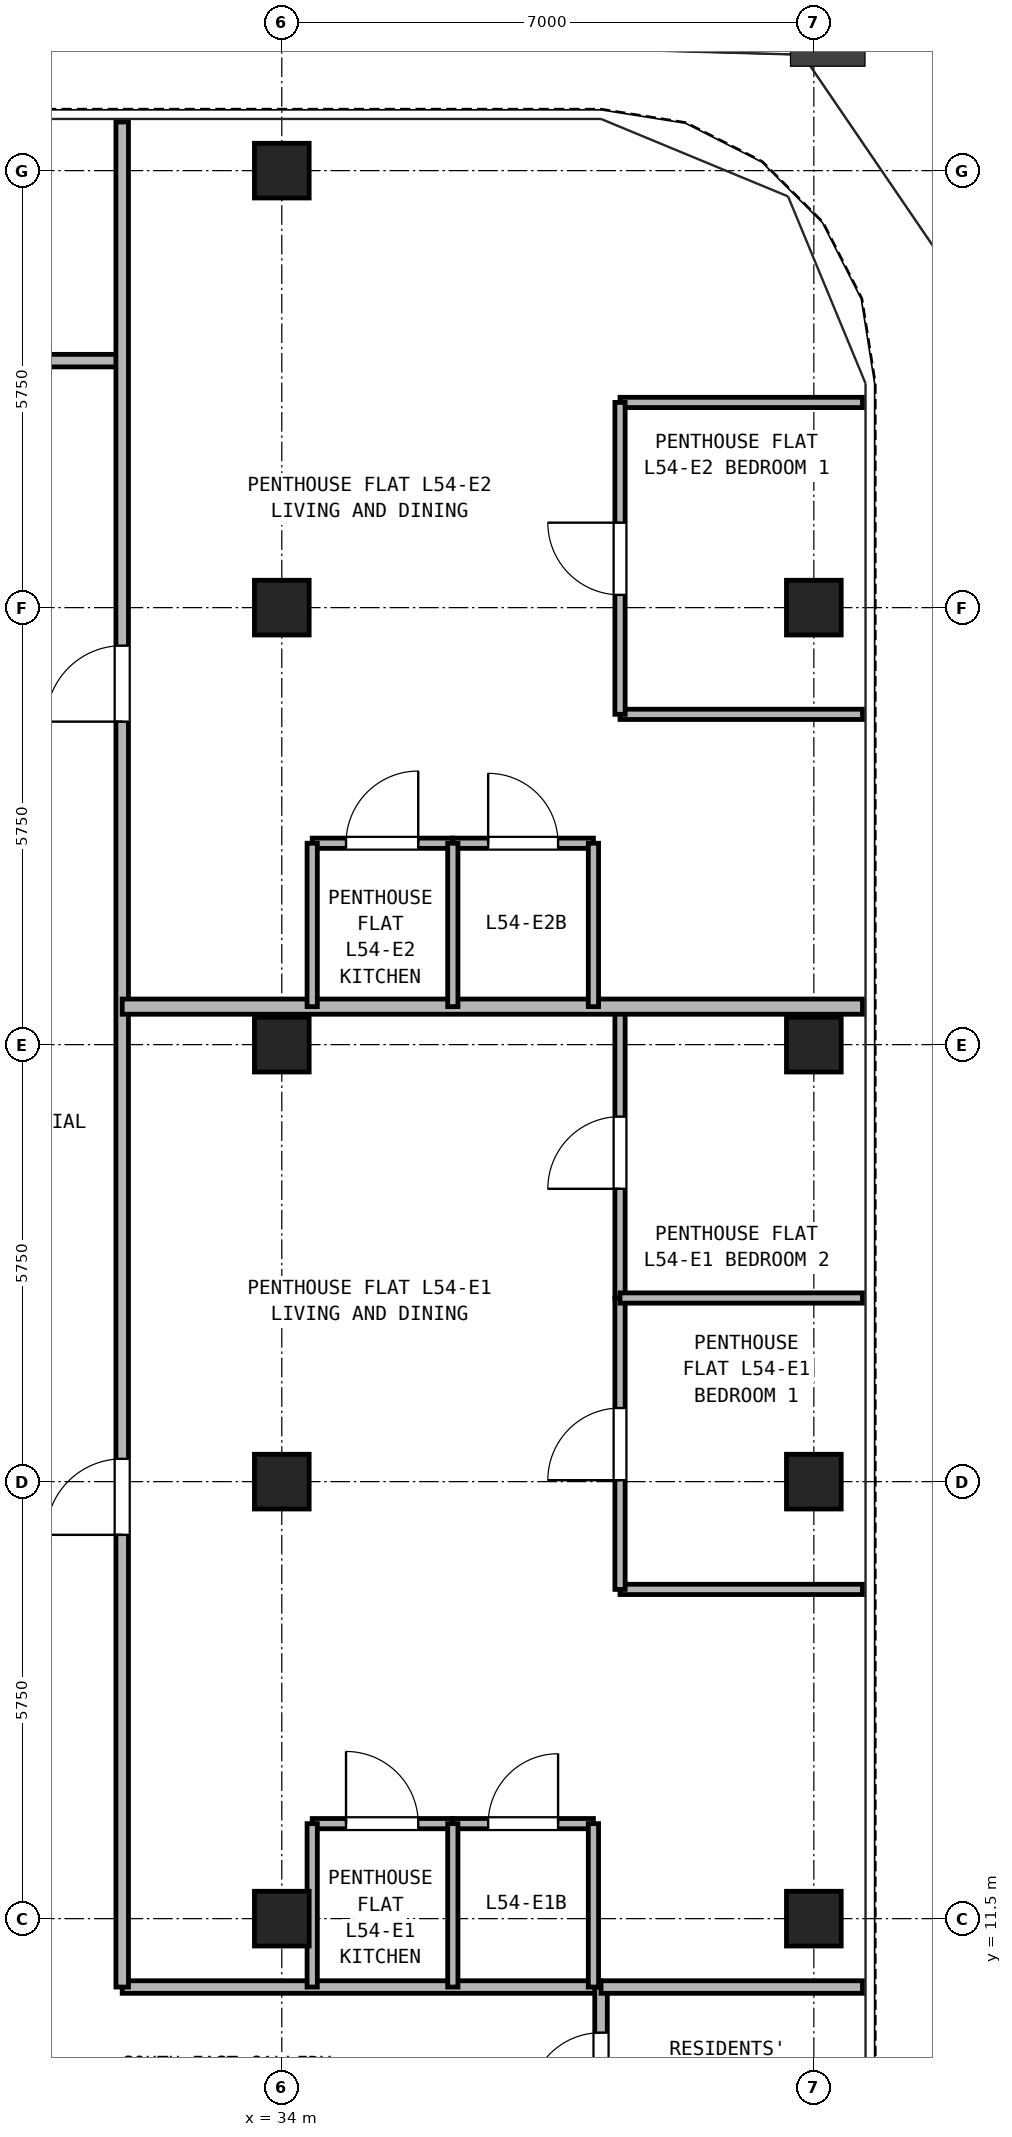
"""IFC4 building model, lengths in metres.
Left out: names, types, materials, properties, quantities, classifications, styles, units other than length and angle.
Written with IfcOpenShell. Run it as: python <this file> out.ifc"""

import sys

from ifc_helpers import new_model, si_unit, direction, frame, frame_2d, origin, origin_2d, place, context, subcontext, project, spatial, rectangle, hollow_rectangle, extrude, source, transform, mapped, element, fill, save


model = new_model("IFC4")
c1 = context("Model", 3, precision=1e-05, world=origin(), true_north=direction((0.0, 1.0)))
c2 = subcontext(c1, "Body", "Model", "MODEL_VIEW")
j1 = project(units=[si_unit("LENGTHUNIT", "METRE"), si_unit("PLANEANGLEUNIT", "RADIAN")], contexts=[c1])
p1 = place(None, origin())
s1 = spatial("IfcSite", under=j1, at=p1, CompositionType="ELEMENT")
p2 = place(p1, origin())
s2 = spatial("IfcBuilding", under=s1, at=p2, CompositionType="ELEMENT")
p3 = place(p2, frame((0.0, 0.0, 193.2)))
s3 = spatial("IfcBuildingStorey", under=s2, at=p3, CompositionType="ELEMENT", Elevation=193.2)
m1 = source(origin(), c2, "Body", "SweptSolid", [
    extrude(hollow_rectangle(XDim=0.72, YDim=0.72, WallThickness=0.04, at=origin_2d()), origin(), (0.0, 0.0, 1.0), 2.95),
])
for number, where, z_axis, x_axis in (
    (1, (34.0, 34.5, 0.0), (0.0, 0.0, 1.0), (1.0, 0.0, 0.0)),
    (2, (41.0, 11.5, 0.0), (0.0, 0.0, 1.0), (1.0, 0.0, 0.0)),
    (3, (41.0, 17.25, 0.0), (0.0, 0.0, 1.0), (1.0, 0.0, 0.0)),
    (4, (41.0, 23.0, 0.0), (0.0, 0.0, 1.0), (1.0, 0.0, 0.0)),
    (5, (41.0, 28.75, 0.0), (0.0, 0.0, 1.0), (1.0, 0.0, 0.0)),
    (6, (34.0, 11.5, 0.0), (0.0, 0.0, 1.0), (1.0, 0.0, 0.0)),
    (7, (34.0, 17.25, 0.0), (0.0, 0.0, 1.0), (1.0, 0.0, 0.0)),
    (8, (34.0, 23.0, 0.0), (0.0, 0.0, 1.0), (1.0, 0.0, 0.0)),
    (9, (34.0, 28.75, 0.0), (0.0, 0.0, 1.0), (1.0, 0.0, 0.0)),
):
    element("IfcColumn", number, at=place(p3, frame(where, z_axis=z_axis, x_axis=x_axis)), inside=s3, PredefinedType="COLUMN", context=c2, shape_type="MappedRepresentation", body=[
        mapped(m1, transform((0.0, 0.0, 0.0), x_axis=(1.0, 0.0, 0.0), y_axis=(0.0, 1.0, 0.0), z_axis=(0.0, 0.0, 1.0), scale=1.0)),
    ])
p4 = place(p3, frame((31.9, 10.6, 0.0), z_axis=(0.0, 0.0, 1.0), x_axis=(1.0, 0.0, 0.0)))
e10 = element("IfcWall", 10, at=p4, inside=s3, PredefinedType="PARTITIONING", context=c2, shape_type="SweptSolid", body=[
    extrude(rectangle(XDim=6.3, YDim=0.165, at=frame_2d((3.15, 0.0))), origin(), (0.0, 0.0, 1.0), 2.95),
])
p5 = place(p3, frame((38.2, 8.6, 0.0), z_axis=(0.0, 0.0, 1.0), x_axis=(0.0, 1.0, 0.0)))
e11 = element("IfcWall", 11, at=p5, inside=s3, PredefinedType="PARTITIONING", context=c2, shape_type="SweptSolid", body=[
    extrude(rectangle(XDim=2.0, YDim=0.165, at=frame_2d((1.0, 0.0))), origin(), (0.0, 0.0, 1.0), 2.95),
])
p6 = place(p5, frame((0.45, 0.0, 0.0)))
e12 = element("IfcOpeningElement", 12, at=p6, cuts=e11, PredefinedType="OPENING", context=c2, shape_type="SweptSolid", body=[
    extrude(rectangle(XDim=0.95, YDim=2.15, at=frame_2d((0.475, 1.075))), frame((0.0, 0.093, 0.0), z_axis=(0.0, -1.0, 0.0), x_axis=(1.0, 0.0, 0.0)), (0.0, 0.0, 1.0), 0.185),
])
p7 = place(p3, frame((15.1, 32.0, 0.0), z_axis=(0.0, 0.0, 1.0), x_axis=(1.0, 0.0, 0.0)))
e13 = element("IfcWall", 13, at=p7, inside=s3, PredefinedType="PARTITIONING", context=c2, shape_type="SweptSolid", body=[
    extrude(rectangle(XDim=16.8, YDim=0.165, at=frame_2d((8.4, 0.0))), origin(), (0.0, 0.0, 1.0), 2.95),
])
p8 = place(p7, frame((2.7, 0.0, 0.0)))
e14 = element("IfcOpeningElement", 14, at=p8, cuts=e13, PredefinedType="OPENING", context=c2, shape_type="SweptSolid", body=[
    extrude(rectangle(XDim=0.95, YDim=2.15, at=frame_2d((0.475, 1.075))), frame((0.0, 0.093, 0.0), z_axis=(0.0, -1.0, 0.0), x_axis=(1.0, 0.0, 0.0)), (0.0, 0.0, 1.0), 0.185),
])
p9 = place(p7, frame((8.1, 0.0, 0.0)))
e15 = element("IfcOpeningElement", 15, at=p9, cuts=e13, PredefinedType="OPENING", context=c2, shape_type="SweptSolid", body=[
    extrude(rectangle(XDim=0.95, YDim=2.15, at=frame_2d((0.475, 1.075))), frame((0.0, 0.093, 0.0), z_axis=(0.0, -1.0, 0.0), x_axis=(1.0, 0.0, 0.0)), (0.0, 0.0, 1.0), 0.185),
])
p10 = place(p7, frame((13.3, 0.0, 0.0)))
e16 = element("IfcOpeningElement", 16, at=p10, cuts=e13, PredefinedType="OPENING", context=c2, shape_type="SweptSolid", body=[
    extrude(rectangle(XDim=0.92, YDim=2.1, at=frame_2d((0.46, 1.05))), frame((0.0, 0.093, 0.0), z_axis=(0.0, -1.0, 0.0), x_axis=(1.0, 0.0, 0.0)), (0.0, 0.0, 1.0), 0.185),
])
p11 = place(p3, frame((31.9, 10.6, 0.0), z_axis=(0.0, 0.0, 1.0), x_axis=(0.0, 1.0, 0.0)))
e17 = element("IfcWall", 17, at=p11, inside=s3, PredefinedType="PARTITIONING", context=c2, shape_type="SweptSolid", body=[
    extrude(rectangle(XDim=24.54, YDim=0.165, at=frame_2d((12.27, 0.0))), origin(), (0.0, 0.0, 1.0), 2.95),
])
p12 = place(p11, frame((5.95, 0.0, 0.0)))
e18 = element("IfcOpeningElement", 18, at=p12, cuts=e17, PredefinedType="OPENING", context=c2, shape_type="SweptSolid", body=[
    extrude(rectangle(XDim=1.0, YDim=2.15, at=frame_2d((0.5, 1.075))), frame((0.0, 0.093, 0.0), z_axis=(0.0, -1.0, 0.0), x_axis=(1.0, 0.0, 0.0)), (0.0, 0.0, 1.0), 0.185),
])
p13 = place(p11, frame((16.65, 0.0, 0.0)))
e19 = element("IfcOpeningElement", 19, at=p13, cuts=e17, PredefinedType="OPENING", context=c2, shape_type="SweptSolid", body=[
    extrude(rectangle(XDim=1.0, YDim=2.15, at=frame_2d((0.5, 1.075))), frame((0.0, 0.093, 0.0), z_axis=(0.0, -1.0, 0.0), x_axis=(1.0, 0.0, 0.0)), (0.0, 0.0, 1.0), 0.185),
])
p14 = place(p3, frame((38.2, 10.6, 0.0), z_axis=(0.0, 0.0, 1.0), x_axis=(1.0, 0.0, 0.0)))
e20 = element("IfcWall", 20, at=p14, inside=s3, PredefinedType="PARTITIONING", context=c2, shape_type="SweptSolid", body=[
    extrude(rectangle(XDim=3.44, YDim=0.165, at=frame_2d((1.72, 0.0))), origin(), (0.0, 0.0, 1.0), 2.95),
])
p15 = place(p3, frame((34.4, 12.75, 0.0), z_axis=(0.0, 0.0, 1.0), x_axis=(1.0, 0.0, 0.0)))
e21 = element("IfcWall", 21, at=p15, inside=s3, PredefinedType="PARTITIONING", context=c2, shape_type="SweptSolid", body=[
    extrude(rectangle(XDim=1.85, YDim=0.135, at=frame_2d((0.925, 0.0))), origin(), (0.0, 0.0, 1.0), 2.95),
])
p16 = place(p15, frame((0.445, 0.0, 0.0)))
e22 = element("IfcOpeningElement", 22, at=p16, cuts=e21, PredefinedType="OPENING", context=c2, shape_type="SweptSolid", body=[
    extrude(rectangle(XDim=0.95, YDim=2.15, at=frame_2d((0.475, 1.075))), frame((0.0, 0.077, 0.0), z_axis=(0.0, -1.0, 0.0), x_axis=(1.0, 0.0, 0.0)), (0.0, 0.0, 1.0), 0.155),
])
p17 = place(p3, frame((36.25, 12.75, 0.0), z_axis=(0.0, 0.0, 1.0), x_axis=(1.0, 0.0, 0.0)))
e23 = element("IfcWall", 23, at=p17, inside=s3, PredefinedType="PARTITIONING", context=c2, shape_type="SweptSolid", body=[
    extrude(rectangle(XDim=1.85, YDim=0.135, at=frame_2d((0.925, 0.0))), origin(), (0.0, 0.0, 1.0), 2.95),
])
p18 = place(p17, frame((0.465, 0.0, 0.0)))
e24 = element("IfcOpeningElement", 24, at=p18, cuts=e23, PredefinedType="OPENING", context=c2, shape_type="SweptSolid", body=[
    extrude(rectangle(XDim=0.92, YDim=2.1, at=frame_2d((0.46, 1.05))), frame((0.0, 0.077, 0.0), z_axis=(0.0, -1.0, 0.0), x_axis=(1.0, 0.0, 0.0)), (0.0, 0.0, 1.0), 0.155),
])
for number, where, z_axis, x_axis in (
    (25, (34.4, 10.6, 0.0), (0.0, 0.0, 1.0), (0.0, 1.0, 0.0)),
    (26, (36.25, 10.6, 0.0), (0.0, 0.0, 1.0), (0.0, 1.0, 0.0)),
    (27, (38.1, 10.6, 0.0), (0.0, 0.0, 1.0), (0.0, 1.0, 0.0)),
):
    element("IfcWall", number, at=place(p3, frame(where, z_axis=z_axis, x_axis=x_axis)), inside=s3, PredefinedType="PARTITIONING", context=c2, shape_type="SweptSolid", body=[
        extrude(rectangle(XDim=2.15, YDim=0.135, at=frame_2d((1.075, 0.0))), origin(), (0.0, 0.0, 1.0), 2.95),
    ])
p19 = place(p3, frame((38.45, 15.832, 0.0), z_axis=(0.0, 0.0, 1.0), x_axis=(1.0, 0.0, 0.0)))
e28 = element("IfcWall", 28, at=p19, inside=s3, PredefinedType="PARTITIONING", context=c2, shape_type="SweptSolid", body=[
    extrude(rectangle(XDim=3.19, YDim=0.135, at=frame_2d((1.595, 0.0))), origin(), (0.0, 0.0, 1.0), 2.95),
])
p20 = place(p3, frame((38.45, 15.832, 0.0), z_axis=(0.0, 0.0, 1.0), x_axis=(0.0, 1.0, 0.0)))
e29 = element("IfcWall", 29, at=p20, inside=s3, PredefinedType="PARTITIONING", context=c2, shape_type="SweptSolid", body=[
    extrude(rectangle(XDim=3.834, YDim=0.135, at=frame_2d((1.917, 0.0))), origin(), (0.0, 0.0, 1.0), 2.95),
])
p21 = place(p20, frame((1.437, 0.0, 0.0)))
e30 = element("IfcOpeningElement", 30, at=p21, cuts=e29, PredefinedType="OPENING", context=c2, shape_type="SweptSolid", body=[
    extrude(rectangle(XDim=0.95, YDim=2.15, at=frame_2d((0.475, 1.075))), frame((0.0, 0.077, 0.0), z_axis=(0.0, -1.0, 0.0), x_axis=(1.0, 0.0, 0.0)), (0.0, 0.0, 1.0), 0.155),
])
p22 = place(p3, frame((38.45, 19.666, 0.0), z_axis=(0.0, 0.0, 1.0), x_axis=(0.0, 1.0, 0.0)))
e31 = element("IfcWall", 31, at=p22, inside=s3, PredefinedType="PARTITIONING", context=c2, shape_type="SweptSolid", body=[
    extrude(rectangle(XDim=3.834, YDim=0.135, at=frame_2d((1.917, 0.0))), origin(), (0.0, 0.0, 1.0), 2.95),
])
p23 = place(p22, frame((1.437, 0.0, 0.0)))
e32 = element("IfcOpeningElement", 32, at=p23, cuts=e31, PredefinedType="OPENING", context=c2, shape_type="SweptSolid", body=[
    extrude(rectangle(XDim=0.95, YDim=2.15, at=frame_2d((0.475, 1.075))), frame((0.0, 0.077, 0.0), z_axis=(0.0, -1.0, 0.0), x_axis=(1.0, 0.0, 0.0)), (0.0, 0.0, 1.0), 0.155),
])
p24 = place(p3, frame((38.45, 19.666, 0.0), z_axis=(0.0, 0.0, 1.0), x_axis=(1.0, 0.0, 0.0)))
e33 = element("IfcWall", 33, at=p24, inside=s3, PredefinedType="PARTITIONING", context=c2, shape_type="SweptSolid", body=[
    extrude(rectangle(XDim=3.19, YDim=0.135, at=frame_2d((1.595, 0.0))), origin(), (0.0, 0.0, 1.0), 2.95),
])
p25 = place(p3, frame((31.9, 23.5, 0.0), z_axis=(0.0, 0.0, 1.0), x_axis=(1.0, 0.0, 0.0)))
e34 = element("IfcWall", 34, at=p25, inside=s3, PredefinedType="PARTITIONING", context=c2, shape_type="SweptSolid", body=[
    extrude(rectangle(XDim=9.74, YDim=0.2, at=frame_2d((4.87, 0.0))), origin(), (0.0, 0.0, 1.0), 2.95),
])
p26 = place(p3, frame((34.4, 25.65, 0.0), z_axis=(0.0, 0.0, 1.0), x_axis=(1.0, 0.0, 0.0)))
e35 = element("IfcWall", 35, at=p26, inside=s3, PredefinedType="PARTITIONING", context=c2, shape_type="SweptSolid", body=[
    extrude(rectangle(XDim=1.85, YDim=0.135, at=frame_2d((0.925, 0.0))), origin(), (0.0, 0.0, 1.0), 2.583),
])
p27 = place(p26, frame((0.445, 0.0, 0.0)))
e36 = element("IfcOpeningElement", 36, at=p27, cuts=e35, PredefinedType="OPENING", context=c2, shape_type="SweptSolid", body=[
    extrude(rectangle(XDim=0.95, YDim=2.15, at=frame_2d((0.475, 1.075))), frame((0.0, 0.077, 0.0), z_axis=(0.0, -1.0, 0.0), x_axis=(1.0, 0.0, 0.0)), (0.0, 0.0, 1.0), 0.155),
])
p28 = place(p3, frame((36.25, 25.65, 0.0), z_axis=(0.0, 0.0, 1.0), x_axis=(1.0, 0.0, 0.0)))
e37 = element("IfcWall", 37, at=p28, inside=s3, PredefinedType="PARTITIONING", context=c2, shape_type="SweptSolid", body=[
    extrude(rectangle(XDim=1.85, YDim=0.135, at=frame_2d((0.925, 0.0))), origin(), (0.0, 0.0, 1.0), 2.583),
])
p29 = place(p28, frame((0.465, 0.0, 0.0)))
e38 = element("IfcOpeningElement", 38, at=p29, cuts=e37, PredefinedType="OPENING", context=c2, shape_type="SweptSolid", body=[
    extrude(rectangle(XDim=0.92, YDim=2.1, at=frame_2d((0.46, 1.05))), frame((0.0, 0.077, 0.0), z_axis=(0.0, -1.0, 0.0), x_axis=(1.0, 0.0, 0.0)), (0.0, 0.0, 1.0), 0.155),
])
for number, where, z_axis, x_axis in (
    (39, (34.4, 23.5, 0.0), (0.0, 0.0, 1.0), (0.0, 1.0, 0.0)),
    (40, (36.25, 23.5, 0.0), (0.0, 0.0, 1.0), (0.0, 1.0, 0.0)),
    (41, (38.1, 23.5, 0.0), (0.0, 0.0, 1.0), (0.0, 1.0, 0.0)),
):
    element("IfcWall", number, at=place(p3, frame(where, z_axis=z_axis, x_axis=x_axis)), inside=s3, PredefinedType="PARTITIONING", context=c2, shape_type="SweptSolid", body=[
        extrude(rectangle(XDim=2.15, YDim=0.135, at=frame_2d((1.075, 0.0))), origin(), (0.0, 0.0, 1.0), 2.95),
    ])
for number, where, z_axis, x_axis in (
    (42, (38.45, 27.346, 0.0), (0.0, 0.0, 1.0), (1.0, 0.0, 0.0)),
    (43, (38.45, 31.45, 0.0), (0.0, 0.0, 1.0), (1.0, 0.0, 0.0)),
):
    element("IfcWall", number, at=place(p3, frame(where, z_axis=z_axis, x_axis=x_axis)), inside=s3, PredefinedType="PARTITIONING", context=c2, shape_type="SweptSolid", body=[
        extrude(rectangle(XDim=3.19, YDim=0.135, at=frame_2d((1.595, 0.0))), origin(), (0.0, 0.0, 1.0), 2.95),
    ])
p30 = place(p3, frame((38.45, 27.346, 0.0), z_axis=(0.0, 0.0, 1.0), x_axis=(0.0, 1.0, 0.0)))
e44 = element("IfcWall", 44, at=p30, inside=s3, PredefinedType="PARTITIONING", context=c2, shape_type="SweptSolid", body=[
    extrude(rectangle(XDim=4.104, YDim=0.135, at=frame_2d((2.052, 0.0))), origin(), (0.0, 0.0, 1.0), 2.95),
])
p31 = place(p30, frame((1.572, 0.0, 0.0)))
e45 = element("IfcOpeningElement", 45, at=p31, cuts=e44, PredefinedType="OPENING", context=c2, shape_type="SweptSolid", body=[
    extrude(rectangle(XDim=0.95, YDim=2.15, at=frame_2d((0.475, 1.075))), frame((0.0, 0.077, 0.0), z_axis=(0.0, -1.0, 0.0), x_axis=(1.0, 0.0, 0.0)), (0.0, 0.0, 1.0), 0.155),
])
p32 = place(p6, origin())
e46 = element("IfcDoor", 46, at=p32, inside=s3, OperationType="SINGLE_SWING_LEFT", PredefinedType="DOOR", context=c2, shape_type="SweptSolid", body=[
    extrude(rectangle(XDim=0.95, YDim=2.15, at=frame_2d((0.475, 1.075))), frame((0.0, 0.025, 0.0), z_axis=(0.0, -1.0, 0.0), x_axis=(1.0, 0.0, 0.0)), (0.0, 0.0, 1.0), 0.05),
])
fill(e12, e46)
p33 = place(p16, origin())
e47 = element("IfcDoor", 47, at=p33, inside=s3, OperationType="SINGLE_SWING_LEFT", PredefinedType="DOOR", context=c2, shape_type="SweptSolid", body=[
    extrude(rectangle(XDim=0.95, YDim=2.15, at=frame_2d((0.475, 1.075))), frame((0.0, 0.025, 0.0), z_axis=(0.0, -1.0, 0.0), x_axis=(1.0, 0.0, 0.0)), (0.0, 0.0, 1.0), 0.05),
])
fill(e22, e47)
p34 = place(p18, origin())
e48 = element("IfcDoor", 48, at=p34, inside=s3, OperationType="SINGLE_SWING_RIGHT", PredefinedType="DOOR", context=c2, shape_type="SweptSolid", body=[
    extrude(rectangle(XDim=0.92, YDim=2.1, at=frame_2d((0.46, 1.05))), frame((0.0, 0.025, 0.0), z_axis=(0.0, -1.0, 0.0), x_axis=(1.0, 0.0, 0.0)), (0.0, 0.0, 1.0), 0.05),
])
fill(e24, e48)
p35 = place(p21, frame((0.95, 0.0, 0.0), z_axis=(0.0, 0.0, 1.0), x_axis=(-1.0, 0.0, 0.0)))
e49 = element("IfcDoor", 49, at=p35, inside=s3, OperationType="SINGLE_SWING_LEFT", PredefinedType="DOOR", context=c2, shape_type="SweptSolid", body=[
    extrude(rectangle(XDim=0.95, YDim=2.15, at=frame_2d((0.475, 1.075))), frame((0.0, 0.025, 0.0), z_axis=(0.0, -1.0, 0.0), x_axis=(1.0, 0.0, 0.0)), (0.0, 0.0, 1.0), 0.05),
])
fill(e30, e49)
p36 = place(p23, frame((0.95, 0.0, 0.0), z_axis=(0.0, 0.0, 1.0), x_axis=(-1.0, 0.0, 0.0)))
e50 = element("IfcDoor", 50, at=p36, inside=s3, OperationType="SINGLE_SWING_LEFT", PredefinedType="DOOR", context=c2, shape_type="SweptSolid", body=[
    extrude(rectangle(XDim=0.95, YDim=2.15, at=frame_2d((0.475, 1.075))), frame((0.0, 0.025, 0.0), z_axis=(0.0, -1.0, 0.0), x_axis=(1.0, 0.0, 0.0)), (0.0, 0.0, 1.0), 0.05),
])
fill(e32, e50)
p37 = place(p12, frame((1.0, 0.0, 0.0), z_axis=(0.0, 0.0, 1.0), x_axis=(-1.0, 0.0, 0.0)))
e51 = element("IfcDoor", 51, at=p37, inside=s3, OperationType="SINGLE_SWING_LEFT", PredefinedType="DOOR", context=c2, shape_type="SweptSolid", body=[
    extrude(rectangle(XDim=1.0, YDim=2.15, at=frame_2d((0.5, 1.075))), frame((0.0, 0.025, 0.0), z_axis=(0.0, -1.0, 0.0), x_axis=(1.0, 0.0, 0.0)), (0.0, 0.0, 1.0), 0.05),
])
fill(e18, e51)
p38 = place(p27, origin())
e52 = element("IfcDoor", 52, at=p38, inside=s3, OperationType="SINGLE_SWING_RIGHT", PredefinedType="DOOR", context=c2, shape_type="SweptSolid", body=[
    extrude(rectangle(XDim=0.95, YDim=2.15, at=frame_2d((0.475, 1.075))), frame((0.0, 0.025, 0.0), z_axis=(0.0, -1.0, 0.0), x_axis=(1.0, 0.0, 0.0)), (0.0, 0.0, 1.0), 0.05),
])
fill(e36, e52)
p39 = place(p29, origin())
e53 = element("IfcDoor", 53, at=p39, inside=s3, OperationType="SINGLE_SWING_LEFT", PredefinedType="DOOR", context=c2, shape_type="SweptSolid", body=[
    extrude(rectangle(XDim=0.92, YDim=2.1, at=frame_2d((0.46, 1.05))), frame((0.0, 0.025, 0.0), z_axis=(0.0, -1.0, 0.0), x_axis=(1.0, 0.0, 0.0)), (0.0, 0.0, 1.0), 0.05),
])
fill(e38, e53)
p40 = place(p31, frame((0.95, 0.0, 0.0), z_axis=(0.0, 0.0, 1.0), x_axis=(-1.0, 0.0, 0.0)))
e54 = element("IfcDoor", 54, at=p40, inside=s3, OperationType="SINGLE_SWING_RIGHT", PredefinedType="DOOR", context=c2, shape_type="SweptSolid", body=[
    extrude(rectangle(XDim=0.95, YDim=2.15, at=frame_2d((0.475, 1.075))), frame((0.0, 0.025, 0.0), z_axis=(0.0, -1.0, 0.0), x_axis=(1.0, 0.0, 0.0)), (0.0, 0.0, 1.0), 0.05),
])
fill(e45, e54)
p41 = place(p13, frame((1.0, 0.0, 0.0), z_axis=(0.0, 0.0, 1.0), x_axis=(-1.0, 0.0, 0.0)))
e55 = element("IfcDoor", 55, at=p41, inside=s3, OperationType="SINGLE_SWING_LEFT", PredefinedType="DOOR", context=c2, shape_type="SweptSolid", body=[
    extrude(rectangle(XDim=1.0, YDim=2.15, at=frame_2d((0.5, 1.075))), frame((0.0, 0.025, 0.0), z_axis=(0.0, -1.0, 0.0), x_axis=(1.0, 0.0, 0.0)), (0.0, 0.0, 1.0), 0.05),
])
fill(e19, e55)
save(model, sys.argv[1])
